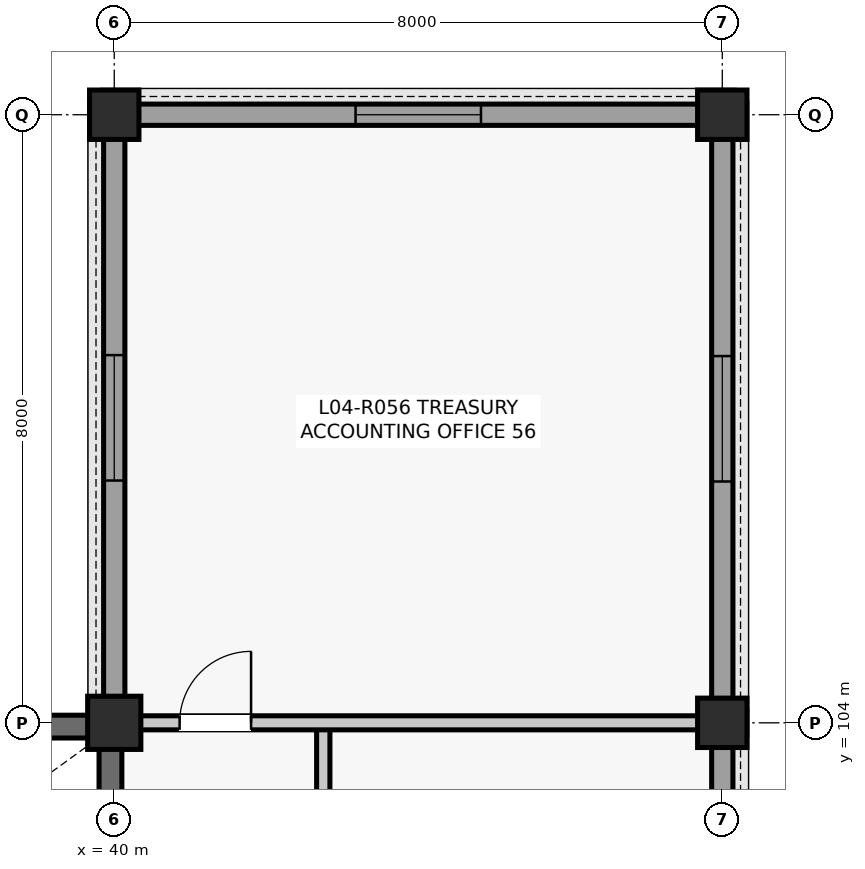
"""IFC4 building model, lengths in metres.
Left out: names, types, materials, properties, quantities, classifications, styles, units other than length and angle.
Written with IfcOpenShell. Run it as: python <this file> out.ifc"""

import sys

from ifc_helpers import new_model, si_unit, direction, frame, frame_2d, origin, origin_2d, place, context, subcontext, project, spatial, rectangle, extrude, element, fill, save


model = new_model("IFC4")
c1 = context("Model", 3, precision=1e-05, world=origin(), true_north=direction((0.0, 1.0)))
c2 = subcontext(c1, "Body", "Model", "MODEL_VIEW")
j1 = project(units=[si_unit("LENGTHUNIT", "METRE"), si_unit("PLANEANGLEUNIT", "RADIAN")], contexts=[c1])
p1 = place(None, origin())
s1 = spatial("IfcSite", under=j1, at=p1, CompositionType="ELEMENT")
p2 = place(p1, origin())
s2 = spatial("IfcBuilding", under=s1, at=p2, CompositionType="ELEMENT")
p3 = place(p2, frame((0.0, 0.0, 17.82)))
s3 = spatial("IfcBuildingStorey", under=s2, at=p3, CompositionType="ELEMENT", Elevation=17.82)
p4 = place(p3, frame((40.0, 104.0, 0.0), z_axis=(0.0, 0.0, 1.0), x_axis=(1.0, 0.0, 0.0)))
e1 = element("IfcColumn", 1, at=p4, inside=s3, PredefinedType="COLUMN", context=c2, shape_type="SweptSolid", body=[
    extrude(rectangle(XDim=0.7, YDim=0.7, at=origin_2d()), origin(), (0.0, 0.0, 1.0), 3.96),
])
for number, where, z_axis, x_axis in (
    (2, (40.0, 112.0, 0.0), (0.0, 0.0, 1.0), (1.0, 0.0, 0.0)),
    (3, (48.0, 104.0, 0.0), (0.0, 0.0, 1.0), (1.0, 0.0, 0.0)),
    (4, (48.0, 112.0, 0.0), (0.0, 0.0, 1.0), (1.0, 0.0, 0.0)),
):
    element("IfcColumn", number, at=place(p3, frame(where, z_axis=z_axis, x_axis=x_axis)), inside=s3, PredefinedType="COLUMN", context=c2, shape_type="SweptSolid", body=[
        extrude(rectangle(XDim=0.65, YDim=0.65, at=origin_2d()), origin(), (0.0, 0.0, 1.0), 3.96),
    ])
p5 = place(p3, frame((48.0, 96.31, 0.0), z_axis=(0.0, 0.0, 1.0), x_axis=(0.0, 1.0, 0.0)))
e5 = element("IfcWall", 5, at=p5, inside=s3, PredefinedType="SOLIDWALL", context=c2, shape_type="SweptSolid", body=[
    extrude(rectangle(XDim=7.38, YDim=0.28, at=frame_2d((3.69, 0.0))), origin(), (0.0, 0.0, 1.0), 3.314),
])
p6 = place(p5, frame((2.59, 0.0, 0.9)))
e6 = element("IfcOpeningElement", 6, at=p6, cuts=e5, PredefinedType="OPENING", context=c2, shape_type="SweptSolid", body=[
    extrude(rectangle(XDim=2.2, YDim=2.0, at=frame_2d((1.1, 1.0))), frame((0.0, 0.15, 0.0), z_axis=(0.0, -1.0, 0.0), x_axis=(1.0, 0.0, 0.0)), (0.0, 0.0, 1.0), 0.3),
])
p7 = place(p3, frame((40.31, 112.0, 0.0), z_axis=(0.0, 0.0, 1.0), x_axis=(1.0, 0.0, 0.0)))
e7 = element("IfcWall", 7, at=p7, inside=s3, PredefinedType="SOLIDWALL", context=c2, shape_type="SweptSolid", body=[
    extrude(rectangle(XDim=7.38, YDim=0.28, at=frame_2d((3.69, 0.0))), origin(), (0.0, 0.0, 1.0), 3.377),
])
p8 = place(p7, frame((2.865, 0.0, 0.9)))
e8 = element("IfcOpeningElement", 8, at=p8, cuts=e7, PredefinedType="OPENING", context=c2, shape_type="SweptSolid", body=[
    extrude(rectangle(XDim=1.65, YDim=1.75, at=frame_2d((0.825, 0.875))), frame((0.0, 0.15, 0.0), z_axis=(0.0, -1.0, 0.0), x_axis=(1.0, 0.0, 0.0)), (0.0, 0.0, 1.0), 0.3),
])
p9 = place(p3, frame((40.0, 104.335, 0.0), z_axis=(0.0, 0.0, 1.0), x_axis=(0.0, 1.0, 0.0)))
e9 = element("IfcWall", 9, at=p9, inside=s3, PredefinedType="SOLIDWALL", context=c2, shape_type="SweptSolid", body=[
    extrude(rectangle(XDim=7.355, YDim=0.28, at=frame_2d((3.677, 0.0))), origin(), (0.0, 0.0, 1.0), 3.314),
])
p10 = place(p9, frame((2.853, 0.0, 0.9)))
e10 = element("IfcOpeningElement", 10, at=p10, cuts=e9, PredefinedType="OPENING", context=c2, shape_type="SweptSolid", body=[
    extrude(rectangle(XDim=1.65, YDim=1.75, at=frame_2d((0.825, 0.875))), frame((0.0, 0.15, 0.0), z_axis=(0.0, -1.0, 0.0), x_axis=(1.0, 0.0, 0.0)), (0.0, 0.0, 1.0), 0.3),
])
p11 = place(p3, frame((48.0, 104.31, 0.0), z_axis=(0.0, 0.0, 1.0), x_axis=(0.0, 1.0, 0.0)))
e11 = element("IfcWall", 11, at=p11, inside=s3, PredefinedType="SOLIDWALL", context=c2, shape_type="SweptSolid", body=[
    extrude(rectangle(XDim=7.38, YDim=0.28, at=frame_2d((3.69, 0.0))), origin(), (0.0, 0.0, 1.0), 3.377),
])
p12 = place(p11, frame((2.865, 0.0, 0.9)))
e12 = element("IfcOpeningElement", 12, at=p12, cuts=e11, PredefinedType="OPENING", context=c2, shape_type="SweptSolid", body=[
    extrude(rectangle(XDim=1.65, YDim=1.75, at=frame_2d((0.825, 0.875))), frame((0.0, 0.15, 0.0), z_axis=(0.0, -1.0, 0.0), x_axis=(1.0, 0.0, 0.0)), (0.0, 0.0, 1.0), 0.3),
])
p13 = place(p3, frame((32.24, 103.95, 0.0), z_axis=(0.0, 0.0, 1.0), x_axis=(1.0, 0.0, 0.0)))
e13 = element("IfcWall", 13, at=p13, inside=s3, PredefinedType="SHEAR", context=c2, shape_type="SweptSolid", body=[
    extrude(rectangle(XDim=7.52, YDim=0.3, at=frame_2d((3.76, 0.0))), origin(), (0.0, 0.0, 1.0), 3.367),
])
p14 = place(p3, frame((39.95, 96.24, 0.0), z_axis=(0.0, 0.0, 1.0), x_axis=(0.0, 1.0, 0.0)))
e14 = element("IfcWall", 14, at=p14, inside=s3, PredefinedType="SHEAR", context=c2, shape_type="SweptSolid", body=[
    extrude(rectangle(XDim=7.52, YDim=0.3, at=frame_2d((3.76, 0.0))), origin(), (0.0, 0.0, 1.0), 3.462),
])
p15 = place(p3, frame((42.75, 96.02, 0.0), z_axis=(0.0, 0.0, 1.0), x_axis=(0.0, 1.0, 0.0)))
e15 = element("IfcWall", 15, at=p15, inside=s3, PredefinedType="PARTITIONING", context=c2, shape_type="SweptSolid", body=[
    extrude(rectangle(XDim=7.96, YDim=0.175, at=frame_2d((3.98, 0.0))), origin(), (0.0, 0.0, 1.0), 3.251),
])
p16 = place(p15, frame((3.49, 0.0, 0.0)))
e16 = element("IfcOpeningElement", 16, at=p16, cuts=e15, PredefinedType="OPENING", context=c2, shape_type="SweptSolid", body=[
    extrude(rectangle(XDim=0.98, YDim=2.15, at=frame_2d((0.49, 1.075))), frame((0.0, 0.097, 0.0), z_axis=(0.0, -1.0, 0.0), x_axis=(1.0, 0.0, 0.0)), (0.0, 0.0, 1.0), 0.195),
])
p17 = place(p3, frame((40.34, 104.0, 0.0), z_axis=(0.0, 0.0, 1.0), x_axis=(1.0, 0.0, 0.0)))
e17 = element("IfcWall", 17, at=p17, inside=s3, PredefinedType="PARTITIONING", context=c2, shape_type="SweptSolid", body=[
    extrude(rectangle(XDim=7.345, YDim=0.185, at=frame_2d((3.672, 0.0))), origin(), (0.0, 0.0, 1.0), 3.251),
])
p18 = place(p17, frame((0.52, 0.0, 0.0)))
e18 = element("IfcOpeningElement", 18, at=p18, cuts=e17, PredefinedType="OPENING", context=c2, shape_type="SweptSolid", body=[
    extrude(rectangle(XDim=0.94, YDim=2.12, at=frame_2d((0.47, 1.06))), frame((0.0, 0.103, 0.0), z_axis=(0.0, -1.0, 0.0), x_axis=(1.0, 0.0, 0.0)), (0.0, 0.0, 1.0), 0.205),
])
p19 = place(p8, origin())
e19 = element("IfcWindow", 19, at=p19, inside=s3, PartitioningType="SINGLE_PANEL", PredefinedType="WINDOW", context=c2, shape_type="SweptSolid", body=[
    extrude(rectangle(XDim=1.65, YDim=1.75, at=frame_2d((0.825, 0.875))), frame((0.0, 0.03, 0.0), z_axis=(0.0, -1.0, 0.0), x_axis=(1.0, 0.0, 0.0)), (0.0, 0.0, 1.0), 0.06),
])
fill(e8, e19)
p20 = place(p10, origin())
e20 = element("IfcWindow", 20, at=p20, inside=s3, PartitioningType="SINGLE_PANEL", PredefinedType="WINDOW", context=c2, shape_type="SweptSolid", body=[
    extrude(rectangle(XDim=1.65, YDim=1.75, at=frame_2d((0.825, 0.875))), frame((0.0, 0.03, 0.0), z_axis=(0.0, -1.0, 0.0), x_axis=(1.0, 0.0, 0.0)), (0.0, 0.0, 1.0), 0.06),
])
fill(e10, e20)
p21 = place(p12, origin())
e21 = element("IfcWindow", 21, at=p21, inside=s3, PartitioningType="SINGLE_PANEL", PredefinedType="WINDOW", context=c2, shape_type="SweptSolid", body=[
    extrude(rectangle(XDim=1.65, YDim=1.75, at=frame_2d((0.825, 0.875))), frame((0.0, 0.03, 0.0), z_axis=(0.0, -1.0, 0.0), x_axis=(1.0, 0.0, 0.0)), (0.0, 0.0, 1.0), 0.06),
])
fill(e12, e21)
p22 = place(p18, origin())
e22 = element("IfcDoor", 22, at=p22, inside=s3, OperationType="SINGLE_SWING_RIGHT", PredefinedType="DOOR", context=c2, shape_type="SweptSolid", body=[
    extrude(rectangle(XDim=0.94, YDim=2.12, at=frame_2d((0.47, 1.06))), frame((0.0, 0.025, 0.0), z_axis=(0.0, -1.0, 0.0), x_axis=(1.0, 0.0, 0.0)), (0.0, 0.0, 1.0), 0.05),
])
fill(e18, e22)
save(model, sys.argv[1])
